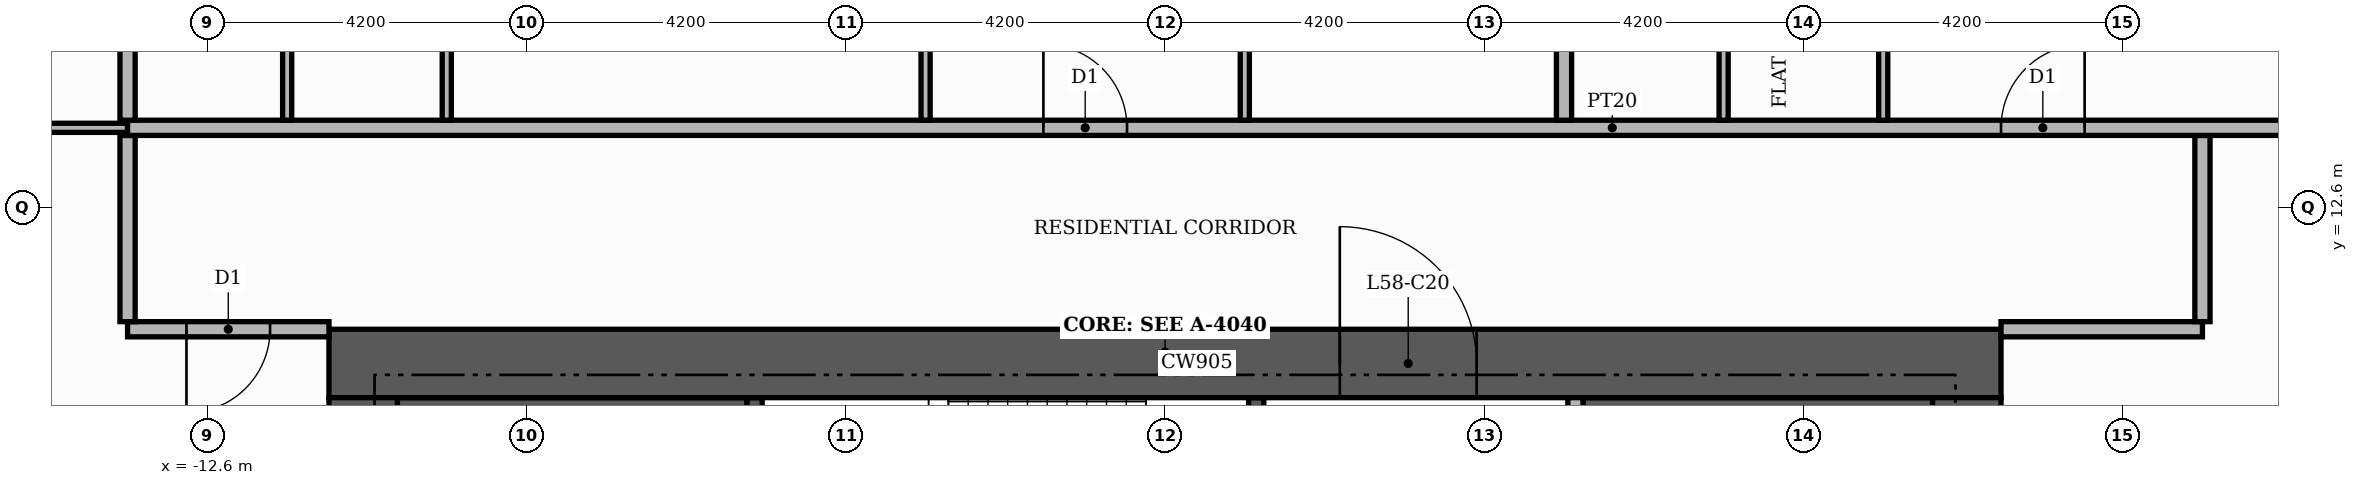
"""IFC4 building model, lengths in metres.
Left out: names, types, materials, properties, quantities, classifications, styles, units other than length and angle.
Written with IfcOpenShell. Run it as: python <this file> out.ifc"""

import sys

from ifc_helpers import new_model, si_unit, direction, frame, frame_2d, origin, place, context, subcontext, project, spatial, rectangle, extrude, element, fill, save


model = new_model("IFC4")
c1 = context("Model", 3, precision=1e-05, world=origin(), true_north=direction((0.0, 1.0)))
c2 = subcontext(c1, "Body", "Model", "MODEL_VIEW")
j1 = project(units=[si_unit("LENGTHUNIT", "METRE"), si_unit("PLANEANGLEUNIT", "RADIAN")], contexts=[c1])
p1 = place(None, origin())
s1 = spatial("IfcSite", under=j1, at=p1, CompositionType="ELEMENT")
p2 = place(p1, origin())
s2 = spatial("IfcBuilding", under=s1, at=p2, CompositionType="ELEMENT")
p3 = place(p2, frame((0.0, 0.0, 244.5)))
s3 = spatial("IfcBuildingStorey", under=s2, at=p3, CompositionType="ELEMENT", Elevation=244.5)
for number, where, z_axis, x_axis in (
    (1, (-10.1, 9.15, 0.0), (0.0, 0.0, 1.0), (1.0, 0.0, 0.0)),
    (2, (5.5, 9.15, 0.0), (0.0, 0.0, 1.0), (1.0, 0.0, 0.0)),
):
    element("IfcWall", number, at=place(p3, frame(where, z_axis=z_axis, x_axis=x_axis)), inside=s3, PredefinedType="SHEAR", context=c2, shape_type="SweptSolid", body=[
        extrude(rectangle(XDim=4.6, YDim=1.9, at=frame_2d((2.3, 0.0))), origin(), (0.0, 0.0, 1.0), 3.48),
    ])
p4 = place(p3, frame((-5.4, 7.25, 0.0), z_axis=(0.0, 0.0, 1.0), x_axis=(0.0, 1.0, 0.0)))
e3 = element("IfcWall", 3, at=p4, inside=s3, PredefinedType="SHEAR", context=c2, shape_type="SweptSolid", body=[
    extrude(rectangle(XDim=2.85, YDim=0.2, at=frame_2d((1.425, 0.0))), origin(), (0.0, 0.0, 1.0), 3.48),
])
p5 = place(p3, frame((1.2, 7.25, 0.0), z_axis=(0.0, 0.0, 1.0), x_axis=(0.0, 1.0, 0.0)))
e4 = element("IfcWall", 4, at=p5, inside=s3, PredefinedType="SHEAR", context=c2, shape_type="SweptSolid", body=[
    extrude(rectangle(XDim=2.85, YDim=0.2, at=frame_2d((1.425, 0.0))), origin(), (0.0, 0.0, 1.0), 3.48),
])
p6 = place(p5, frame((0.85, 0.0, 0.0)))
e5 = element("IfcOpeningElement", 5, at=p6, cuts=e4, PredefinedType="OPENING", context=c2, shape_type="SweptSolid", body=[
    extrude(rectangle(XDim=1.0, YDim=2.1, at=frame_2d((0.5, 1.05))), frame((0.0, 0.11, 0.0), z_axis=(0.0, -1.0, 0.0), x_axis=(1.0, 0.0, 0.0)), (0.0, 0.0, 1.0), 0.22),
])
p7 = place(p3, frame((-11.0, 10.55, 0.0), z_axis=(0.0, 0.0, 1.0), x_axis=(1.0, 0.0, 0.0)))
e6 = element("IfcWall", 6, at=p7, inside=s3, PredefinedType="SHEAR", context=c2, shape_type="SweptSolid", body=[
    extrude(rectangle(XDim=22.0, YDim=0.9, at=frame_2d((11.0, 0.0))), origin(), (0.0, 0.0, 1.0), 3.48),
])
p8 = place(p7, frame((13.3, 0.0, 0.0)))
e7 = element("IfcOpeningElement", 7, at=p8, cuts=e6, PredefinedType="OPENING", context=c2, shape_type="SweptSolid", body=[
    extrude(rectangle(XDim=1.8, YDim=2.2, at=frame_2d((0.9, 1.1))), frame((0.0, 0.46, 0.0), z_axis=(0.0, -1.0, 0.0), x_axis=(1.0, 0.0, 0.0)), (0.0, 0.0, 1.0), 0.92),
])
for number, where, z_axis, x_axis in (
    (8, (-10.55, -10.1, 0.0), (0.0, 0.0, 1.0), (0.0, 1.0, 0.0)),
    (9, (10.55, -10.1, 0.0), (0.0, 0.0, 1.0), (0.0, 1.0, 0.0)),
):
    element("IfcWall", number, at=place(p3, frame(where, z_axis=z_axis, x_axis=x_axis)), inside=s3, PredefinedType="SHEAR", context=c2, shape_type="SweptSolid", body=[
        extrude(rectangle(XDim=20.2, YDim=0.9, at=frame_2d((10.1, 0.0))), origin(), (0.0, 0.0, 1.0), 3.48),
    ])
p9 = place(p3, frame((5.4, 5.5, 0.0), z_axis=(0.0, 0.0, 1.0), x_axis=(0.0, 1.0, 0.0)))
e10 = element("IfcWall", 10, at=p9, inside=s3, PredefinedType="PARTITIONING", context=c2, shape_type="SweptSolid", body=[
    extrude(rectangle(XDim=4.6, YDim=0.2, at=frame_2d((2.3, 0.0))), origin(), (0.0, 0.0, 1.0), 3.48),
])
p10 = place(p9, frame((0.25, 0.0, 0.0)))
e11 = element("IfcOpeningElement", 11, at=p10, cuts=e10, PredefinedType="OPENING", context=c2, shape_type="SweptSolid", body=[
    extrude(rectangle(XDim=1.0, YDim=2.1, at=frame_2d((0.5, 1.05))), frame((0.0, 0.11, 0.0), z_axis=(0.0, -1.0, 0.0), x_axis=(1.0, 0.0, 0.0)), (0.0, 0.0, 1.0), 0.22),
])
p11 = place(p3, frame((-13.65, 11.0, 0.0), z_axis=(0.0, 0.0, 1.0), x_axis=(1.0, 0.0, 0.0)))
e12 = element("IfcWall", 12, at=p11, inside=s3, PredefinedType="PARTITIONING", context=c2, shape_type="SweptSolid", body=[
    extrude(rectangle(XDim=2.65, YDim=0.2, at=frame_2d((1.325, 0.0))), origin(), (0.0, 0.0, 1.0), 3.48),
])
p12 = place(p11, frame((0.775, 0.0, 0.0)))
e13 = element("IfcOpeningElement", 13, at=p12, cuts=e12, PredefinedType="OPENING", context=c2, shape_type="SweptSolid", body=[
    extrude(rectangle(XDim=1.1, YDim=2.4, at=frame_2d((0.55, 1.2))), frame((0.0, 0.11, 0.0), z_axis=(0.0, -1.0, 0.0), x_axis=(1.0, 0.0, 0.0)), (0.0, 0.0, 1.0), 0.22),
])
p13 = place(p3, frame((11.0, 11.0, 0.0), z_axis=(0.0, 0.0, 1.0), x_axis=(1.0, 0.0, 0.0)))
e14 = element("IfcWall", 14, at=p13, inside=s3, PredefinedType="PARTITIONING", context=c2, shape_type="SweptSolid", body=[
    extrude(rectangle(XDim=2.65, YDim=0.2, at=frame_2d((1.325, 0.0))), origin(), (0.0, 0.0, 1.0), 3.48),
])
for number, where, z_axis, x_axis in (
    (15, (-13.65, 11.1, 0.0), (0.0, 0.0, 1.0), (0.0, 1.0, 0.0)),
    (16, (13.65, 11.1, 0.0), (0.0, 0.0, 1.0), (0.0, 1.0, 0.0)),
):
    element("IfcWall", number, at=place(p3, frame(where, z_axis=z_axis, x_axis=x_axis)), inside=s3, PredefinedType="PARTITIONING", context=c2, shape_type="SweptSolid", body=[
        extrude(rectangle(XDim=2.45, YDim=0.2, at=frame_2d((1.225, 0.0))), origin(), (0.0, 0.0, 1.0), 3.48),
    ])
p14 = place(p3, frame((-19.82, 13.65, 0.0), z_axis=(0.0, 0.0, 1.0), x_axis=(1.0, 0.0, 0.0)))
e17 = element("IfcWall", 17, at=p14, inside=s3, PredefinedType="PARTITIONING", context=c2, shape_type="SweptSolid", body=[
    extrude(rectangle(XDim=6.17, YDim=0.12, at=frame_2d((3.085, 0.0))), origin(), (0.0, 0.0, 1.0), 3.48),
])
p15 = place(p14, frame((2.635, 0.0, 0.0)))
e18 = element("IfcOpeningElement", 18, at=p15, cuts=e17, PredefinedType="OPENING", context=c2, shape_type="SweptSolid", body=[
    extrude(rectangle(XDim=0.9, YDim=2.1, at=frame_2d((0.45, 1.05))), frame((0.0, 0.07, 0.0), z_axis=(0.0, -1.0, 0.0), x_axis=(1.0, 0.0, 0.0)), (0.0, 0.0, 1.0), 0.14),
])
p16 = place(p3, frame((-13.65, 13.65, 0.0), z_axis=(0.0, 0.0, 1.0), x_axis=(1.0, 0.0, 0.0)))
e19 = element("IfcWall", 19, at=p16, inside=s3, PredefinedType="PARTITIONING", context=c2, shape_type="SweptSolid", body=[
    extrude(rectangle(XDim=39.07, YDim=0.2, at=frame_2d((19.535, 0.0))), origin(), (0.0, 0.0, 1.0), 3.48),
])
p17 = place(p16, frame((24.65, 0.0, 0.0)))
e20 = element("IfcOpeningElement", 20, at=p17, cuts=e19, PredefinedType="OPENING", context=c2, shape_type="SweptSolid", body=[
    extrude(rectangle(XDim=1.1, YDim=2.4, at=frame_2d((0.55, 1.2))), frame((0.0, 0.11, 0.0), z_axis=(0.0, -1.0, 0.0), x_axis=(1.0, 0.0, 0.0)), (0.0, 0.0, 1.0), 0.22),
])
p18 = place(p16, frame((12.05, 0.0, 0.0)))
e21 = element("IfcOpeningElement", 21, at=p18, cuts=e19, PredefinedType="OPENING", context=c2, shape_type="SweptSolid", body=[
    extrude(rectangle(XDim=1.1, YDim=2.4, at=frame_2d((0.55, 1.2))), frame((0.0, 0.11, 0.0), z_axis=(0.0, -1.0, 0.0), x_axis=(1.0, 0.0, 0.0)), (0.0, 0.0, 1.0), 0.22),
])
p19 = place(p3, frame((-13.65, 13.75, 0.0), z_axis=(0.0, 0.0, 1.0), x_axis=(0.0, 1.0, 0.0)))
e22 = element("IfcWall", 22, at=p19, inside=s3, PredefinedType="PARTITIONING", context=c2, shape_type="SweptSolid", body=[
    extrude(rectangle(XDim=11.67, YDim=0.2, at=frame_2d((5.835, 0.0))), origin(), (0.0, 0.0, 1.0), 3.48),
])
for number, where, z_axis, x_axis in (
    (23, (-11.55, 13.75, 0.0), (0.0, 0.0, 1.0), (0.0, 1.0, 0.0)),
    (24, (-9.45, 13.75, 0.0), (0.0, 0.0, 1.0), (0.0, 1.0, 0.0)),
    (25, (-3.15, 13.75, 0.0), (0.0, 0.0, 1.0), (0.0, 1.0, 0.0)),
):
    element("IfcWall", number, at=place(p3, frame(where, z_axis=z_axis, x_axis=x_axis)), inside=s3, PredefinedType="PARTITIONING", context=c2, shape_type="SweptSolid", body=[
        extrude(rectangle(XDim=5.11, YDim=0.12, at=frame_2d((2.555, 0.0))), origin(), (0.0, 0.0, 1.0), 3.48),
    ])
p20 = place(p3, frame((1.05, 13.75, 0.0), z_axis=(0.0, 0.0, 1.0), x_axis=(0.0, 1.0, 0.0)))
e26 = element("IfcWall", 26, at=p20, inside=s3, PredefinedType="PARTITIONING", context=c2, shape_type="SweptSolid", body=[
    extrude(rectangle(XDim=5.11, YDim=0.12, at=frame_2d((2.555, 0.0))), origin(), (0.0, 0.0, 1.0), 3.48),
])
p21 = place(p20, frame((2.085, 0.0, 0.0)))
e27 = element("IfcOpeningElement", 27, at=p21, cuts=e26, PredefinedType="OPENING", context=c2, shape_type="SweptSolid", body=[
    extrude(rectangle(XDim=0.9, YDim=2.1, at=frame_2d((0.45, 1.05))), frame((0.0, 0.07, 0.0), z_axis=(0.0, -1.0, 0.0), x_axis=(1.0, 0.0, 0.0)), (0.0, 0.0, 1.0), 0.14),
])
p22 = place(p3, frame((5.25, 13.75, 0.0), z_axis=(0.0, 0.0, 1.0), x_axis=(0.0, 1.0, 0.0)))
e28 = element("IfcWall", 28, at=p22, inside=s3, PredefinedType="PARTITIONING", context=c2, shape_type="SweptSolid", body=[
    extrude(rectangle(XDim=11.67, YDim=0.2, at=frame_2d((5.835, 0.0))), origin(), (0.0, 0.0, 1.0), 3.48),
])
p23 = place(p3, frame((7.35, 13.75, 0.0), z_axis=(0.0, 0.0, 1.0), x_axis=(0.0, 1.0, 0.0)))
e29 = element("IfcWall", 29, at=p23, inside=s3, PredefinedType="PARTITIONING", context=c2, shape_type="SweptSolid", body=[
    extrude(rectangle(XDim=4.51, YDim=0.12, at=frame_2d((2.255, 0.0))), origin(), (0.0, 0.0, 1.0), 3.48),
])
p24 = place(p3, frame((9.45, 13.75, 0.0), z_axis=(0.0, 0.0, 1.0), x_axis=(0.0, 1.0, 0.0)))
e30 = element("IfcWall", 30, at=p24, inside=s3, PredefinedType="PARTITIONING", context=c2, shape_type="SweptSolid", body=[
    extrude(rectangle(XDim=4.51, YDim=0.12, at=frame_2d((2.255, 0.0))), origin(), (0.0, 0.0, 1.0), 3.48),
])
p25 = place(p24, frame((1.785, 0.0, 0.0)))
e31 = element("IfcOpeningElement", 31, at=p25, cuts=e30, PredefinedType="OPENING", context=c2, shape_type="SweptSolid", body=[
    extrude(rectangle(XDim=0.9, YDim=2.1, at=frame_2d((0.45, 1.05))), frame((0.0, 0.07, 0.0), z_axis=(0.0, -1.0, 0.0), x_axis=(1.0, 0.0, 0.0)), (0.0, 0.0, 1.0), 0.14),
])
p26 = place(p8, origin())
e32 = element("IfcDoor", 32, at=p26, inside=s3, OperationType="DOUBLE_DOOR_SINGLE_SWING", PredefinedType="DOOR", context=c2, shape_type="SweptSolid", body=[
    extrude(rectangle(XDim=1.8, YDim=2.2, at=frame_2d((0.9, 1.1))), frame((0.0, 0.025, 0.0), z_axis=(0.0, -1.0, 0.0), x_axis=(1.0, 0.0, 0.0)), (0.0, 0.0, 1.0), 0.05),
])
fill(e7, e32)
p27 = place(p17, origin())
e33 = element("IfcDoor", 33, at=p27, inside=s3, OperationType="SINGLE_SWING_RIGHT", PredefinedType="DOOR", context=c2, shape_type="SweptSolid", body=[
    extrude(rectangle(XDim=1.1, YDim=2.4, at=frame_2d((0.55, 1.2))), frame((0.0, 0.025, 0.0), z_axis=(0.0, -1.0, 0.0), x_axis=(1.0, 0.0, 0.0)), (0.0, 0.0, 1.0), 0.05),
])
fill(e20, e33)
p28 = place(p18, origin())
e34 = element("IfcDoor", 34, at=p28, inside=s3, OperationType="SINGLE_SWING_LEFT", PredefinedType="DOOR", context=c2, shape_type="SweptSolid", body=[
    extrude(rectangle(XDim=1.1, YDim=2.4, at=frame_2d((0.55, 1.2))), frame((0.0, 0.025, 0.0), z_axis=(0.0, -1.0, 0.0), x_axis=(1.0, 0.0, 0.0)), (0.0, 0.0, 1.0), 0.05),
])
fill(e21, e34)
p29 = place(p12, frame((1.1, 0.0, 0.0), z_axis=(0.0, 0.0, 1.0), x_axis=(-1.0, 0.0, 0.0)))
e35 = element("IfcDoor", 35, at=p29, inside=s3, OperationType="SINGLE_SWING_LEFT", PredefinedType="DOOR", context=c2, shape_type="SweptSolid", body=[
    extrude(rectangle(XDim=1.1, YDim=2.4, at=frame_2d((0.55, 1.2))), frame((0.0, 0.025, 0.0), z_axis=(0.0, -1.0, 0.0), x_axis=(1.0, 0.0, 0.0)), (0.0, 0.0, 1.0), 0.05),
])
fill(e13, e35)
save(model, sys.argv[1])
